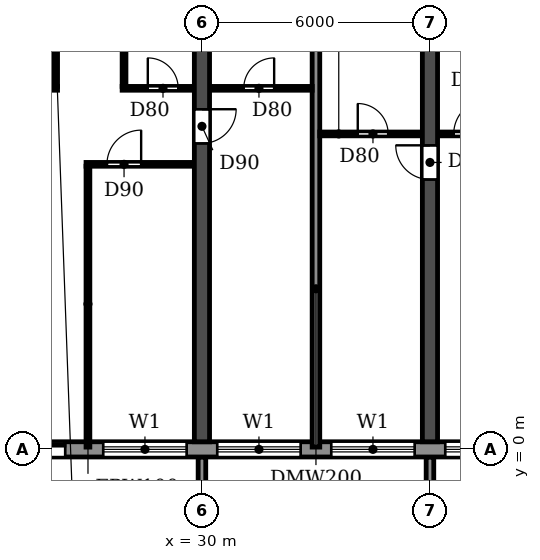
"""IFC4 building model, lengths in metres.
Left out: names, types, materials, properties, quantities, classifications, styles, units other than length and angle.
Written with IfcOpenShell. Run it as: python <this file> out.ifc"""

import sys

from ifc_helpers import new_model, si_unit, direction, frame, frame_2d, origin, place, context, subcontext, project, spatial, polyline, rectangle, outline, extrude, source, transform, mapped, element, fill, save


model = new_model("IFC4")
c1 = context("Model", 3, precision=1e-05, world=origin(), true_north=direction((0.0, 1.0)))
c2 = subcontext(c1, "Body", "Model", "MODEL_VIEW")
j1 = project(units=[si_unit("LENGTHUNIT", "METRE"), si_unit("PLANEANGLEUNIT", "RADIAN")], contexts=[c1])
p1 = place(None, origin())
s1 = spatial("IfcSite", under=j1, at=p1, CompositionType="ELEMENT")
p2 = place(p1, origin())
s2 = spatial("IfcBuilding", under=s1, at=p2, CompositionType="ELEMENT")
p3 = place(p2, frame((0.0, 0.0, 43.2)))
s3 = spatial("IfcBuildingStorey", under=s2, at=p3, CompositionType="ELEMENT", Elevation=43.2)
p4 = place(p3, frame((30.0, 0.2, 0.0), z_axis=(0.0, 0.0, 1.0), x_axis=(0.0, 1.0, 0.0)))
e1 = element("IfcWall", 1, at=p4, inside=s3, PredefinedType="SHEAR", context=c2, shape_type="SweptSolid", body=[
    extrude(rectangle(XDim=11.65, YDim=0.4, at=frame_2d((5.825, 0.0))), origin(), (0.0, 0.0, 1.0), 3.05),
])
p5 = place(p4, frame((7.85, 0.0, 0.0)))
e2 = element("IfcOpeningElement", 2, at=p5, cuts=e1, PredefinedType="OPENING", context=c2, shape_type="SweptSolid", body=[
    extrude(rectangle(XDim=0.9, YDim=2.1, at=frame_2d((0.45, 1.05))), frame((0.0, 0.21, 0.0), z_axis=(0.0, -1.0, 0.0), x_axis=(1.0, 0.0, 0.0)), (0.0, 0.0, 1.0), 0.42),
])
p6 = place(p3, frame((36.0, 0.2, 0.0), z_axis=(0.0, 0.0, 1.0), x_axis=(0.0, 1.0, 0.0)))
e3 = element("IfcWall", 3, at=p6, inside=s3, PredefinedType="SHEAR", context=c2, shape_type="SweptSolid", body=[
    extrude(rectangle(XDim=11.65, YDim=0.4, at=frame_2d((5.825, 0.0))), origin(), (0.0, 0.0, 1.0), 3.05),
])
p7 = place(p6, frame((6.9, 0.0, 0.0)))
e4 = element("IfcOpeningElement", 4, at=p7, cuts=e3, PredefinedType="OPENING", context=c2, shape_type="SweptSolid", body=[
    extrude(rectangle(XDim=0.9, YDim=2.1, at=frame_2d((0.45, 1.05))), frame((0.0, 0.21, 0.0), z_axis=(0.0, -1.0, 0.0), x_axis=(1.0, 0.0, 0.0)), (0.0, 0.0, 1.0), 0.42),
])
p8 = place(p3, frame((4.683, 0.0, 0.0), z_axis=(0.0, 0.0, 1.0), x_axis=(1.0, 0.0, 0.0)))
e5 = element("IfcWall", 5, at=p8, inside=s3, PredefinedType="STANDARD", context=c2, shape_type="SweptSolid", body=[
    extrude(rectangle(XDim=92.634, YDim=0.4, at=frame_2d((46.317, 0.0))), origin(), (0.0, 0.0, 1.0), 3.05),
])
p9 = place(p8, frame((1.717, 0.0, 0.9)))
e6 = element("IfcOpeningElement", 6, at=p9, cuts=e5, PredefinedType="OPENING", context=c2, shape_type="SweptSolid", body=[
    extrude(rectangle(XDim=2.2, YDim=1.5, at=frame_2d((1.1, 0.75))), frame((0.0, 0.21, 0.0), z_axis=(0.0, -1.0, 0.0), x_axis=(1.0, 0.0, 0.0)), (0.0, 0.0, 1.0), 0.42),
])
p10 = place(p8, frame((4.717, 0.0, 0.9)))
e7 = element("IfcOpeningElement", 7, at=p10, cuts=e5, PredefinedType="OPENING", context=c2, shape_type="SweptSolid", body=[
    extrude(rectangle(XDim=2.2, YDim=1.5, at=frame_2d((1.1, 0.75))), frame((0.0, 0.21, 0.0), z_axis=(0.0, -1.0, 0.0), x_axis=(1.0, 0.0, 0.0)), (0.0, 0.0, 1.0), 0.42),
])
p11 = place(p8, frame((7.717, 0.0, 0.9)))
e8 = element("IfcOpeningElement", 8, at=p11, cuts=e5, PredefinedType="OPENING", context=c2, shape_type="SweptSolid", body=[
    extrude(rectangle(XDim=2.2, YDim=1.5, at=frame_2d((1.1, 0.75))), frame((0.0, 0.21, 0.0), z_axis=(0.0, -1.0, 0.0), x_axis=(1.0, 0.0, 0.0)), (0.0, 0.0, 1.0), 0.42),
])
p12 = place(p8, frame((10.917, 0.0, 0.0)))
e9 = element("IfcOpeningElement", 9, at=p12, cuts=e5, PredefinedType="OPENING", context=c2, shape_type="SweptSolid", body=[
    extrude(rectangle(XDim=1.8, YDim=2.4, at=frame_2d((0.9, 1.2))), frame((0.0, 0.21, 0.0), z_axis=(0.0, -1.0, 0.0), x_axis=(1.0, 0.0, 0.0)), (0.0, 0.0, 1.0), 0.42),
])
p13 = place(p8, frame((13.717, 0.0, 0.9)))
e10 = element("IfcOpeningElement", 10, at=p13, cuts=e5, PredefinedType="OPENING", context=c2, shape_type="SweptSolid", body=[
    extrude(rectangle(XDim=2.2, YDim=1.5, at=frame_2d((1.1, 0.75))), frame((0.0, 0.21, 0.0), z_axis=(0.0, -1.0, 0.0), x_axis=(1.0, 0.0, 0.0)), (0.0, 0.0, 1.0), 0.42),
])
p14 = place(p8, frame((16.717, 0.0, 0.9)))
e11 = element("IfcOpeningElement", 11, at=p14, cuts=e5, PredefinedType="OPENING", context=c2, shape_type="SweptSolid", body=[
    extrude(rectangle(XDim=2.2, YDim=1.5, at=frame_2d((1.1, 0.75))), frame((0.0, 0.21, 0.0), z_axis=(0.0, -1.0, 0.0), x_axis=(1.0, 0.0, 0.0)), (0.0, 0.0, 1.0), 0.42),
])
p15 = place(p8, frame((19.917, 0.0, 0.0)))
e12 = element("IfcOpeningElement", 12, at=p15, cuts=e5, PredefinedType="OPENING", context=c2, shape_type="SweptSolid", body=[
    extrude(rectangle(XDim=1.8, YDim=2.4, at=frame_2d((0.9, 1.2))), frame((0.0, 0.21, 0.0), z_axis=(0.0, -1.0, 0.0), x_axis=(1.0, 0.0, 0.0)), (0.0, 0.0, 1.0), 0.42),
])
p16 = place(p8, frame((22.717, 0.0, 0.9)))
e13 = element("IfcOpeningElement", 13, at=p16, cuts=e5, PredefinedType="OPENING", context=c2, shape_type="SweptSolid", body=[
    extrude(rectangle(XDim=2.2, YDim=1.5, at=frame_2d((1.1, 0.75))), frame((0.0, 0.21, 0.0), z_axis=(0.0, -1.0, 0.0), x_axis=(1.0, 0.0, 0.0)), (0.0, 0.0, 1.0), 0.42),
])
p17 = place(p8, frame((25.717, 0.0, 0.9)))
e14 = element("IfcOpeningElement", 14, at=p17, cuts=e5, PredefinedType="OPENING", context=c2, shape_type="SweptSolid", body=[
    extrude(rectangle(XDim=2.2, YDim=1.5, at=frame_2d((1.1, 0.75))), frame((0.0, 0.21, 0.0), z_axis=(0.0, -1.0, 0.0), x_axis=(1.0, 0.0, 0.0)), (0.0, 0.0, 1.0), 0.42),
])
p18 = place(p8, frame((28.717, 0.0, 0.9)))
e15 = element("IfcOpeningElement", 15, at=p18, cuts=e5, PredefinedType="OPENING", context=c2, shape_type="SweptSolid", body=[
    extrude(rectangle(XDim=2.2, YDim=1.5, at=frame_2d((1.1, 0.75))), frame((0.0, 0.21, 0.0), z_axis=(0.0, -1.0, 0.0), x_axis=(1.0, 0.0, 0.0)), (0.0, 0.0, 1.0), 0.42),
])
p19 = place(p8, frame((31.717, 0.0, 0.9)))
e16 = element("IfcOpeningElement", 16, at=p19, cuts=e5, PredefinedType="OPENING", context=c2, shape_type="SweptSolid", body=[
    extrude(rectangle(XDim=2.2, YDim=1.5, at=frame_2d((1.1, 0.75))), frame((0.0, 0.21, 0.0), z_axis=(0.0, -1.0, 0.0), x_axis=(1.0, 0.0, 0.0)), (0.0, 0.0, 1.0), 0.42),
])
p20 = place(p8, frame((34.917, 0.0, 0.0)))
e17 = element("IfcOpeningElement", 17, at=p20, cuts=e5, PredefinedType="OPENING", context=c2, shape_type="SweptSolid", body=[
    extrude(rectangle(XDim=1.8, YDim=2.4, at=frame_2d((0.9, 1.2))), frame((0.0, 0.21, 0.0), z_axis=(0.0, -1.0, 0.0), x_axis=(1.0, 0.0, 0.0)), (0.0, 0.0, 1.0), 0.42),
])
p21 = place(p8, frame((37.717, 0.0, 0.9)))
e18 = element("IfcOpeningElement", 18, at=p21, cuts=e5, PredefinedType="OPENING", context=c2, shape_type="SweptSolid", body=[
    extrude(rectangle(XDim=2.2, YDim=1.5, at=frame_2d((1.1, 0.75))), frame((0.0, 0.21, 0.0), z_axis=(0.0, -1.0, 0.0), x_axis=(1.0, 0.0, 0.0)), (0.0, 0.0, 1.0), 0.42),
])
p22 = place(p8, frame((40.717, 0.0, 0.9)))
e19 = element("IfcOpeningElement", 19, at=p22, cuts=e5, PredefinedType="OPENING", context=c2, shape_type="SweptSolid", body=[
    extrude(rectangle(XDim=2.2, YDim=1.5, at=frame_2d((1.1, 0.75))), frame((0.0, 0.21, 0.0), z_axis=(0.0, -1.0, 0.0), x_axis=(1.0, 0.0, 0.0)), (0.0, 0.0, 1.0), 0.42),
])
p23 = place(p8, frame((43.717, 0.0, 0.9)))
e20 = element("IfcOpeningElement", 20, at=p23, cuts=e5, PredefinedType="OPENING", context=c2, shape_type="SweptSolid", body=[
    extrude(rectangle(XDim=2.2, YDim=1.5, at=frame_2d((1.1, 0.75))), frame((0.0, 0.21, 0.0), z_axis=(0.0, -1.0, 0.0), x_axis=(1.0, 0.0, 0.0)), (0.0, 0.0, 1.0), 0.42),
])
p24 = place(p8, frame((46.917, 0.0, 0.0)))
e21 = element("IfcOpeningElement", 21, at=p24, cuts=e5, PredefinedType="OPENING", context=c2, shape_type="SweptSolid", body=[
    extrude(rectangle(XDim=1.8, YDim=2.4, at=frame_2d((0.9, 1.2))), frame((0.0, 0.21, 0.0), z_axis=(0.0, -1.0, 0.0), x_axis=(1.0, 0.0, 0.0)), (0.0, 0.0, 1.0), 0.42),
])
p25 = place(p8, frame((49.717, 0.0, 0.9)))
e22 = element("IfcOpeningElement", 22, at=p25, cuts=e5, PredefinedType="OPENING", context=c2, shape_type="SweptSolid", body=[
    extrude(rectangle(XDim=2.2, YDim=1.5, at=frame_2d((1.1, 0.75))), frame((0.0, 0.21, 0.0), z_axis=(0.0, -1.0, 0.0), x_axis=(1.0, 0.0, 0.0)), (0.0, 0.0, 1.0), 0.42),
])
p26 = place(p8, frame((52.717, 0.0, 0.9)))
e23 = element("IfcOpeningElement", 23, at=p26, cuts=e5, PredefinedType="OPENING", context=c2, shape_type="SweptSolid", body=[
    extrude(rectangle(XDim=2.2, YDim=1.5, at=frame_2d((1.1, 0.75))), frame((0.0, 0.21, 0.0), z_axis=(0.0, -1.0, 0.0), x_axis=(1.0, 0.0, 0.0)), (0.0, 0.0, 1.0), 0.42),
])
p27 = place(p8, frame((55.717, 0.0, 0.9)))
e24 = element("IfcOpeningElement", 24, at=p27, cuts=e5, PredefinedType="OPENING", context=c2, shape_type="SweptSolid", body=[
    extrude(rectangle(XDim=2.2, YDim=1.5, at=frame_2d((1.1, 0.75))), frame((0.0, 0.21, 0.0), z_axis=(0.0, -1.0, 0.0), x_axis=(1.0, 0.0, 0.0)), (0.0, 0.0, 1.0), 0.42),
])
p28 = place(p8, frame((58.917, 0.0, 0.0)))
e25 = element("IfcOpeningElement", 25, at=p28, cuts=e5, PredefinedType="OPENING", context=c2, shape_type="SweptSolid", body=[
    extrude(rectangle(XDim=1.8, YDim=2.4, at=frame_2d((0.9, 1.2))), frame((0.0, 0.21, 0.0), z_axis=(0.0, -1.0, 0.0), x_axis=(1.0, 0.0, 0.0)), (0.0, 0.0, 1.0), 0.42),
])
p29 = place(p8, frame((61.717, 0.0, 0.9)))
e26 = element("IfcOpeningElement", 26, at=p29, cuts=e5, PredefinedType="OPENING", context=c2, shape_type="SweptSolid", body=[
    extrude(rectangle(XDim=2.2, YDim=1.5, at=frame_2d((1.1, 0.75))), frame((0.0, 0.21, 0.0), z_axis=(0.0, -1.0, 0.0), x_axis=(1.0, 0.0, 0.0)), (0.0, 0.0, 1.0), 0.42),
])
p30 = place(p8, frame((64.717, 0.0, 0.9)))
e27 = element("IfcOpeningElement", 27, at=p30, cuts=e5, PredefinedType="OPENING", context=c2, shape_type="SweptSolid", body=[
    extrude(rectangle(XDim=2.2, YDim=1.5, at=frame_2d((1.1, 0.75))), frame((0.0, 0.21, 0.0), z_axis=(0.0, -1.0, 0.0), x_axis=(1.0, 0.0, 0.0)), (0.0, 0.0, 1.0), 0.42),
])
p31 = place(p8, frame((67.717, 0.0, 0.9)))
e28 = element("IfcOpeningElement", 28, at=p31, cuts=e5, PredefinedType="OPENING", context=c2, shape_type="SweptSolid", body=[
    extrude(rectangle(XDim=2.2, YDim=1.5, at=frame_2d((1.1, 0.75))), frame((0.0, 0.21, 0.0), z_axis=(0.0, -1.0, 0.0), x_axis=(1.0, 0.0, 0.0)), (0.0, 0.0, 1.0), 0.42),
])
p32 = place(p8, frame((70.917, 0.0, 0.0)))
e29 = element("IfcOpeningElement", 29, at=p32, cuts=e5, PredefinedType="OPENING", context=c2, shape_type="SweptSolid", body=[
    extrude(rectangle(XDim=1.8, YDim=2.4, at=frame_2d((0.9, 1.2))), frame((0.0, 0.21, 0.0), z_axis=(0.0, -1.0, 0.0), x_axis=(1.0, 0.0, 0.0)), (0.0, 0.0, 1.0), 0.42),
])
p33 = place(p8, frame((73.717, 0.0, 0.9)))
e30 = element("IfcOpeningElement", 30, at=p33, cuts=e5, PredefinedType="OPENING", context=c2, shape_type="SweptSolid", body=[
    extrude(rectangle(XDim=2.2, YDim=1.5, at=frame_2d((1.1, 0.75))), frame((0.0, 0.21, 0.0), z_axis=(0.0, -1.0, 0.0), x_axis=(1.0, 0.0, 0.0)), (0.0, 0.0, 1.0), 0.42),
])
p34 = place(p8, frame((76.717, 0.0, 0.9)))
e31 = element("IfcOpeningElement", 31, at=p34, cuts=e5, PredefinedType="OPENING", context=c2, shape_type="SweptSolid", body=[
    extrude(rectangle(XDim=2.2, YDim=1.5, at=frame_2d((1.1, 0.75))), frame((0.0, 0.21, 0.0), z_axis=(0.0, -1.0, 0.0), x_axis=(1.0, 0.0, 0.0)), (0.0, 0.0, 1.0), 0.42),
])
p35 = place(p8, frame((79.717, 0.0, 0.9)))
e32 = element("IfcOpeningElement", 32, at=p35, cuts=e5, PredefinedType="OPENING", context=c2, shape_type="SweptSolid", body=[
    extrude(rectangle(XDim=2.2, YDim=1.5, at=frame_2d((1.1, 0.75))), frame((0.0, 0.21, 0.0), z_axis=(0.0, -1.0, 0.0), x_axis=(1.0, 0.0, 0.0)), (0.0, 0.0, 1.0), 0.42),
])
p36 = place(p8, frame((82.917, 0.0, 0.0)))
e33 = element("IfcOpeningElement", 33, at=p36, cuts=e5, PredefinedType="OPENING", context=c2, shape_type="SweptSolid", body=[
    extrude(rectangle(XDim=1.8, YDim=2.4, at=frame_2d((0.9, 1.2))), frame((0.0, 0.21, 0.0), z_axis=(0.0, -1.0, 0.0), x_axis=(1.0, 0.0, 0.0)), (0.0, 0.0, 1.0), 0.42),
])
p37 = place(p8, frame((85.717, 0.0, 0.9)))
e34 = element("IfcOpeningElement", 34, at=p37, cuts=e5, PredefinedType="OPENING", context=c2, shape_type="SweptSolid", body=[
    extrude(rectangle(XDim=2.2, YDim=1.5, at=frame_2d((1.1, 0.75))), frame((0.0, 0.21, 0.0), z_axis=(0.0, -1.0, 0.0), x_axis=(1.0, 0.0, 0.0)), (0.0, 0.0, 1.0), 0.42),
])
p38 = place(p8, frame((88.717, 0.0, 0.9)))
e35 = element("IfcOpeningElement", 35, at=p38, cuts=e5, PredefinedType="OPENING", context=c2, shape_type="SweptSolid", body=[
    extrude(rectangle(XDim=2.2, YDim=1.5, at=frame_2d((1.1, 0.75))), frame((0.0, 0.21, 0.0), z_axis=(0.0, -1.0, 0.0), x_axis=(1.0, 0.0, 0.0)), (0.0, 0.0, 1.0), 0.42),
])
m1 = source(origin(), c2, "Body", "SweptSolid", [
    extrude(outline(polyline([(0.0, 0.0), (0.2, 0.0), (0.2, 1.65), (0.0, 1.65), (0.0, 0.0)])), origin(), (0.0, 0.0, 1.0), 3.1),
])
for number, where in (
    (36, (29.9, -1.85, 0.0)),
    (37, (35.9, -1.85, 0.0)),
):
    element("IfcWall", number, at=place(p3, frame(where)), inside=s3, PredefinedType="STANDARD", context=c2, shape_type="MappedRepresentation", body=[
        mapped(m1, transform((0.0, 0.0, 0.0))),
    ])
p39 = place(p3, frame((33.0, 0.06, 0.0), z_axis=(0.0, 0.0, 1.0), x_axis=(0.0, 1.0, 0.0)))
e38 = element("IfcWall", 38, at=p39, inside=s3, PredefinedType="PARTITIONING", context=c2, shape_type="SweptSolid", body=[
    extrude(rectangle(XDim=11.78, YDim=0.2, at=frame_2d((5.89, 0.0))), origin(), (0.0, 0.0, 1.0), 3.05),
])
p40 = place(p3, frame((26.95, 7.5, 0.0), z_axis=(0.0, 0.0, 1.0), x_axis=(1.0, 0.0, 0.0)))
e39 = element("IfcWall", 39, at=p40, inside=s3, PredefinedType="PARTITIONING", context=c2, shape_type="SweptSolid", body=[
    extrude(rectangle(XDim=2.84, YDim=0.1, at=frame_2d((1.42, 0.0))), origin(), (0.0, 0.0, 1.0), 3.05),
])
p41 = place(p40, frame((0.55, 0.0, 0.0)))
e40 = element("IfcOpeningElement", 40, at=p41, cuts=e39, PredefinedType="OPENING", context=c2, shape_type="SweptSolid", body=[
    extrude(rectangle(XDim=0.9, YDim=2.1, at=frame_2d((0.45, 1.05))), frame((0.0, 0.06, 0.0), z_axis=(0.0, -1.0, 0.0), x_axis=(1.0, 0.0, 0.0)), (0.0, 0.0, 1.0), 0.12),
])
p42 = place(p3, frame((33.1, 8.3, 0.0), z_axis=(0.0, 0.0, 1.0), x_axis=(1.0, 0.0, 0.0)))
e41 = element("IfcWall", 41, at=p42, inside=s3, PredefinedType="PARTITIONING", context=c2, shape_type="SweptSolid", body=[
    extrude(rectangle(XDim=2.69, YDim=0.1, at=frame_2d((1.345, 0.0))), origin(), (0.0, 0.0, 1.0), 3.05),
])
p43 = place(p42, frame((1.0, 0.0, 0.0)))
e42 = element("IfcOpeningElement", 42, at=p43, cuts=e41, PredefinedType="OPENING", context=c2, shape_type="SweptSolid", body=[
    extrude(rectangle(XDim=0.8, YDim=2.1, at=frame_2d((0.4, 1.05))), frame((0.0, 0.06, 0.0), z_axis=(0.0, -1.0, 0.0), x_axis=(1.0, 0.0, 0.0)), (0.0, 0.0, 1.0), 0.12),
])
p44 = place(p3, frame((36.21, 8.3, 0.0), z_axis=(0.0, 0.0, 1.0), x_axis=(1.0, 0.0, 0.0)))
e43 = element("IfcWall", 43, at=p44, inside=s3, PredefinedType="PARTITIONING", context=c2, shape_type="SweptSolid", body=[
    extrude(rectangle(XDim=1.99, YDim=0.1, at=frame_2d((0.995, 0.0))), origin(), (0.0, 0.0, 1.0), 3.05),
])
p45 = place(p44, frame((0.415, 0.0, 0.0)))
e44 = element("IfcOpeningElement", 44, at=p45, cuts=e43, PredefinedType="OPENING", context=c2, shape_type="SweptSolid", body=[
    extrude(rectangle(XDim=0.9, YDim=2.1, at=frame_2d((0.45, 1.05))), frame((0.0, 0.06, 0.0), z_axis=(0.0, -1.0, 0.0), x_axis=(1.0, 0.0, 0.0)), (0.0, 0.0, 1.0), 0.12),
])
p46 = place(p3, frame((24.21, 9.5, 0.0), z_axis=(0.0, 0.0, 1.0), x_axis=(1.0, 0.0, 0.0)))
e45 = element("IfcWall", 45, at=p46, inside=s3, PredefinedType="PARTITIONING", context=c2, shape_type="SweptSolid", body=[
    extrude(rectangle(XDim=1.99, YDim=0.1, at=frame_2d((0.995, 0.0))), origin(), (0.0, 0.0, 1.0), 3.05),
])
p47 = place(p46, frame((0.415, 0.0, 0.0)))
e46 = element("IfcOpeningElement", 46, at=p47, cuts=e45, PredefinedType="OPENING", context=c2, shape_type="SweptSolid", body=[
    extrude(rectangle(XDim=0.9, YDim=2.1, at=frame_2d((0.45, 1.05))), frame((0.0, 0.06, 0.0), z_axis=(0.0, -1.0, 0.0), x_axis=(1.0, 0.0, 0.0)), (0.0, 0.0, 1.0), 0.12),
])
p48 = place(p3, frame((27.9, 9.5, 0.0), z_axis=(0.0, 0.0, 1.0), x_axis=(1.0, 0.0, 0.0)))
e47 = element("IfcWall", 47, at=p48, inside=s3, PredefinedType="PARTITIONING", context=c2, shape_type="SweptSolid", body=[
    extrude(rectangle(XDim=1.89, YDim=0.1, at=frame_2d((0.945, 0.0))), origin(), (0.0, 0.0, 1.0), 3.05),
])
p49 = place(p48, frame((0.675, 0.0, 0.0)))
e48 = element("IfcOpeningElement", 48, at=p49, cuts=e47, PredefinedType="OPENING", context=c2, shape_type="SweptSolid", body=[
    extrude(rectangle(XDim=0.8, YDim=2.1, at=frame_2d((0.4, 1.05))), frame((0.0, 0.06, 0.0), z_axis=(0.0, -1.0, 0.0), x_axis=(1.0, 0.0, 0.0)), (0.0, 0.0, 1.0), 0.12),
])
p50 = place(p3, frame((30.21, 9.5, 0.0), z_axis=(0.0, 0.0, 1.0), x_axis=(1.0, 0.0, 0.0)))
e49 = element("IfcWall", 49, at=p50, inside=s3, PredefinedType="PARTITIONING", context=c2, shape_type="SweptSolid", body=[
    extrude(rectangle(XDim=2.69, YDim=0.1, at=frame_2d((1.345, 0.0))), origin(), (0.0, 0.0, 1.0), 3.05),
])
p51 = place(p50, frame((0.89, 0.0, 0.0)))
e50 = element("IfcOpeningElement", 50, at=p51, cuts=e49, PredefinedType="OPENING", context=c2, shape_type="SweptSolid", body=[
    extrude(rectangle(XDim=0.8, YDim=2.1, at=frame_2d((0.4, 1.05))), frame((0.0, 0.06, 0.0), z_axis=(0.0, -1.0, 0.0), x_axis=(1.0, 0.0, 0.0)), (0.0, 0.0, 1.0), 0.12),
])
p52 = place(p3, frame((26.15, 9.55, 0.0), z_axis=(0.0, 0.0, 1.0), x_axis=(0.0, 1.0, 0.0)))
e51 = element("IfcWall", 51, at=p52, inside=s3, PredefinedType="PARTITIONING", context=c2, shape_type="SweptSolid", body=[
    extrude(rectangle(XDim=2.29, YDim=0.1, at=frame_2d((1.145, 0.0))), origin(), (0.0, 0.0, 1.0), 3.05),
])
p53 = place(p3, frame((27.0, 0.06, 0.0), z_axis=(0.0, 0.0, 1.0), x_axis=(0.0, 1.0, 0.0)))
e52 = element("IfcWall", 52, at=p53, inside=s3, PredefinedType="PARTITIONING", context=c2, shape_type="SweptSolid", body=[
    extrude(rectangle(XDim=7.39, YDim=0.1, at=frame_2d((3.695, 0.0))), origin(), (0.0, 0.0, 1.0), 3.05),
])
p54 = place(p3, frame((27.95, 9.55, 0.0), z_axis=(0.0, 0.0, 1.0), x_axis=(0.0, 1.0, 0.0)))
e53 = element("IfcWall", 53, at=p54, inside=s3, PredefinedType="PARTITIONING", context=c2, shape_type="SweptSolid", body=[
    extrude(rectangle(XDim=2.29, YDim=0.1, at=frame_2d((1.145, 0.0))), origin(), (0.0, 0.0, 1.0), 3.05),
])
p55 = place(p15, origin())
e54 = element("IfcDoor", 54, at=p55, inside=s3, OperationType="DOUBLE_DOOR_SLIDING", PredefinedType="DOOR", context=c2, shape_type="SweptSolid", body=[
    extrude(rectangle(XDim=1.8, YDim=2.4, at=frame_2d((0.9, 1.2))), frame((0.0, 0.025, 0.0), z_axis=(0.0, -1.0, 0.0), x_axis=(1.0, 0.0, 0.0)), (0.0, 0.0, 1.0), 0.05),
])
fill(e12, e54)
p56 = place(p16, origin())
e55 = element("IfcWindow", 55, at=p56, inside=s3, PartitioningType="DOUBLE_PANEL_HORIZONTAL", PredefinedType="WINDOW", context=c2, shape_type="SweptSolid", body=[
    extrude(rectangle(XDim=2.2, YDim=1.5, at=frame_2d((1.1, 0.75))), frame((0.0, 0.03, 0.0), z_axis=(0.0, -1.0, 0.0), x_axis=(1.0, 0.0, 0.0)), (0.0, 0.0, 1.0), 0.06),
])
fill(e13, e55)
p57 = place(p17, origin())
e56 = element("IfcWindow", 56, at=p57, inside=s3, PartitioningType="DOUBLE_PANEL_HORIZONTAL", PredefinedType="WINDOW", context=c2, shape_type="SweptSolid", body=[
    extrude(rectangle(XDim=2.2, YDim=1.5, at=frame_2d((1.1, 0.75))), frame((0.0, 0.03, 0.0), z_axis=(0.0, -1.0, 0.0), x_axis=(1.0, 0.0, 0.0)), (0.0, 0.0, 1.0), 0.06),
])
fill(e14, e56)
p58 = place(p18, origin())
e57 = element("IfcWindow", 57, at=p58, inside=s3, PartitioningType="DOUBLE_PANEL_HORIZONTAL", PredefinedType="WINDOW", context=c2, shape_type="SweptSolid", body=[
    extrude(rectangle(XDim=2.2, YDim=1.5, at=frame_2d((1.1, 0.75))), frame((0.0, 0.03, 0.0), z_axis=(0.0, -1.0, 0.0), x_axis=(1.0, 0.0, 0.0)), (0.0, 0.0, 1.0), 0.06),
])
fill(e15, e57)
p59 = place(p19, origin())
e58 = element("IfcWindow", 58, at=p59, inside=s3, PartitioningType="DOUBLE_PANEL_HORIZONTAL", PredefinedType="WINDOW", context=c2, shape_type="SweptSolid", body=[
    extrude(rectangle(XDim=2.2, YDim=1.5, at=frame_2d((1.1, 0.75))), frame((0.0, 0.03, 0.0), z_axis=(0.0, -1.0, 0.0), x_axis=(1.0, 0.0, 0.0)), (0.0, 0.0, 1.0), 0.06),
])
fill(e16, e58)
p60 = place(p51, origin())
e59 = element("IfcDoor", 59, at=p60, inside=s3, OperationType="SINGLE_SWING_RIGHT", PredefinedType="DOOR", context=c2, shape_type="SweptSolid", body=[
    extrude(rectangle(XDim=0.8, YDim=2.1, at=frame_2d((0.4, 1.05))), frame((0.0, 0.025, 0.0), z_axis=(0.0, -1.0, 0.0), x_axis=(1.0, 0.0, 0.0)), (0.0, 0.0, 1.0), 0.05),
])
fill(e50, e59)
p61 = place(p41, origin())
e60 = element("IfcDoor", 60, at=p61, inside=s3, OperationType="SINGLE_SWING_RIGHT", PredefinedType="DOOR", context=c2, shape_type="SweptSolid", body=[
    extrude(rectangle(XDim=0.9, YDim=2.1, at=frame_2d((0.45, 1.05))), frame((0.0, 0.025, 0.0), z_axis=(0.0, -1.0, 0.0), x_axis=(1.0, 0.0, 0.0)), (0.0, 0.0, 1.0), 0.05),
])
fill(e40, e60)
p62 = place(p49, origin())
e61 = element("IfcDoor", 61, at=p62, inside=s3, OperationType="SINGLE_SWING_LEFT", PredefinedType="DOOR", context=c2, shape_type="SweptSolid", body=[
    extrude(rectangle(XDim=0.8, YDim=2.1, at=frame_2d((0.4, 1.05))), frame((0.0, 0.025, 0.0), z_axis=(0.0, -1.0, 0.0), x_axis=(1.0, 0.0, 0.0)), (0.0, 0.0, 1.0), 0.05),
])
fill(e48, e61)
p63 = place(p5, frame((0.9, 0.0, 0.0), z_axis=(0.0, 0.0, 1.0), x_axis=(-1.0, 0.0, 0.0)))
e62 = element("IfcDoor", 62, at=p63, inside=s3, OperationType="SINGLE_SWING_LEFT", PredefinedType="DOOR", context=c2, shape_type="SweptSolid", body=[
    extrude(rectangle(XDim=0.9, YDim=2.1, at=frame_2d((0.45, 1.05))), frame((0.0, 0.025, 0.0), z_axis=(0.0, -1.0, 0.0), x_axis=(1.0, 0.0, 0.0)), (0.0, 0.0, 1.0), 0.05),
])
fill(e2, e62)
p64 = place(p43, origin())
e63 = element("IfcDoor", 63, at=p64, inside=s3, OperationType="SINGLE_SWING_LEFT", PredefinedType="DOOR", context=c2, shape_type="SweptSolid", body=[
    extrude(rectangle(XDim=0.8, YDim=2.1, at=frame_2d((0.4, 1.05))), frame((0.0, 0.025, 0.0), z_axis=(0.0, -1.0, 0.0), x_axis=(1.0, 0.0, 0.0)), (0.0, 0.0, 1.0), 0.05),
])
fill(e42, e63)
p65 = place(p7, origin())
e64 = element("IfcDoor", 64, at=p65, inside=s3, OperationType="SINGLE_SWING_RIGHT", PredefinedType="DOOR", context=c2, shape_type="SweptSolid", body=[
    extrude(rectangle(XDim=0.9, YDim=2.1, at=frame_2d((0.45, 1.05))), frame((0.0, 0.025, 0.0), z_axis=(0.0, -1.0, 0.0), x_axis=(1.0, 0.0, 0.0)), (0.0, 0.0, 1.0), 0.05),
])
fill(e4, e64)
p66 = place(p45, origin())
e65 = element("IfcDoor", 65, at=p66, inside=s3, OperationType="SINGLE_SWING_RIGHT", PredefinedType="DOOR", context=c2, shape_type="SweptSolid", body=[
    extrude(rectangle(XDim=0.9, YDim=2.1, at=frame_2d((0.45, 1.05))), frame((0.0, 0.025, 0.0), z_axis=(0.0, -1.0, 0.0), x_axis=(1.0, 0.0, 0.0)), (0.0, 0.0, 1.0), 0.05),
])
fill(e44, e65)
save(model, sys.argv[1])
